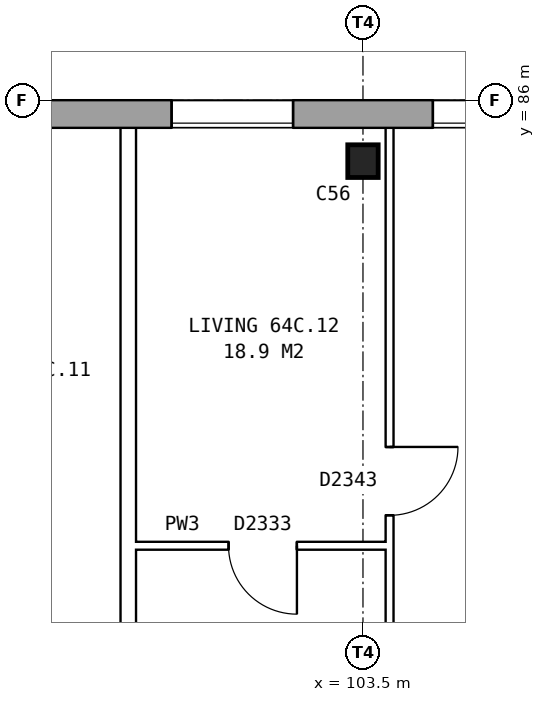
"""IFC4 building model, lengths in metres.
Left out: names, types, materials, properties, quantities, classifications, styles, units other than length and angle.
Written with IfcOpenShell. Run it as: python <this file> out.ifc"""

import sys

from ifc_helpers import new_model, si_unit, direction, frame, frame_2d, origin, origin_2d, place, context, subcontext, project, spatial, rectangle, i_section, extrude, element, fill, save


model = new_model("IFC4")
c1 = context("Model", 3, precision=1e-05, world=origin(), true_north=direction((0.0, 1.0)))
c2 = subcontext(c1, "Body", "Model", "MODEL_VIEW")
j1 = project(units=[si_unit("LENGTHUNIT", "METRE"), si_unit("PLANEANGLEUNIT", "RADIAN")], contexts=[c1])
p1 = place(None, origin())
s1 = spatial("IfcSite", under=j1, at=p1, CompositionType="ELEMENT")
p2 = place(p1, origin())
s2 = spatial("IfcBuilding", under=s1, at=p2, CompositionType="ELEMENT")
p3 = place(p2, frame((0.0, 0.0, 227.6)))
s3 = spatial("IfcBuildingStorey", under=s2, at=p3, CompositionType="ELEMENT", Elevation=227.6)
p4 = place(p3, frame((103.5, 85.2, 0.0), z_axis=(0.0, 0.0, 1.0), x_axis=(1.0, 0.0, 0.0)))
e1 = element("IfcColumn", 1, at=p4, inside=s3, PredefinedType="COLUMN", context=c2, shape_type="SweptSolid", body=[
    extrude(i_section(OverallWidth=0.4, OverallDepth=0.43, WebThickness=0.04, FlangeThickness=0.04, at=origin_2d()), origin(), (0.0, 0.0, 1.0), 2.85),
])
p5 = place(p3, frame((131.05, 85.82, 0.0), z_axis=(0.0, 0.0, 1.0), x_axis=(-1.0, 0.0, 0.0)))
e2 = element("IfcWall", 2, at=p5, inside=s3, PredefinedType="STANDARD", context=c2, shape_type="SweptSolid", body=[
    extrude(rectangle(XDim=55.1, YDim=0.36, at=frame_2d((27.55, 0.0))), origin(), (0.0, 0.0, 1.0), 2.85),
])
p6 = place(p5, frame((0.969, 0.0, 0.8)))
e3 = element("IfcOpeningElement", 3, at=p6, cuts=e2, PredefinedType="OPENING", context=c2, shape_type="SweptSolid", body=[
    extrude(rectangle(XDim=1.6, YDim=1.8, at=frame_2d((0.8, 0.9))), frame((0.0, 0.19, 0.0), z_axis=(0.0, -1.0, 0.0), x_axis=(1.0, 0.0, 0.0)), (0.0, 0.0, 1.0), 0.38),
])
p7 = place(p5, frame((4.406, 0.0, 0.8)))
e4 = element("IfcOpeningElement", 4, at=p7, cuts=e2, PredefinedType="OPENING", context=c2, shape_type="SweptSolid", body=[
    extrude(rectangle(XDim=1.6, YDim=1.8, at=frame_2d((0.8, 0.9))), frame((0.0, 0.19, 0.0), z_axis=(0.0, -1.0, 0.0), x_axis=(1.0, 0.0, 0.0)), (0.0, 0.0, 1.0), 0.38),
])
p8 = place(p5, frame((7.844, 0.0, 0.8)))
e5 = element("IfcOpeningElement", 5, at=p8, cuts=e2, PredefinedType="OPENING", context=c2, shape_type="SweptSolid", body=[
    extrude(rectangle(XDim=1.6, YDim=1.8, at=frame_2d((0.8, 0.9))), frame((0.0, 0.19, 0.0), z_axis=(0.0, -1.0, 0.0), x_axis=(1.0, 0.0, 0.0)), (0.0, 0.0, 1.0), 0.38),
])
p9 = place(p5, frame((11.281, 0.0, 0.8)))
e6 = element("IfcOpeningElement", 6, at=p9, cuts=e2, PredefinedType="OPENING", context=c2, shape_type="SweptSolid", body=[
    extrude(rectangle(XDim=1.6, YDim=1.8, at=frame_2d((0.8, 0.9))), frame((0.0, 0.19, 0.0), z_axis=(0.0, -1.0, 0.0), x_axis=(1.0, 0.0, 0.0)), (0.0, 0.0, 1.0), 0.38),
])
p10 = place(p5, frame((14.719, 0.0, 0.8)))
e7 = element("IfcOpeningElement", 7, at=p10, cuts=e2, PredefinedType="OPENING", context=c2, shape_type="SweptSolid", body=[
    extrude(rectangle(XDim=1.6, YDim=1.8, at=frame_2d((0.8, 0.9))), frame((0.0, 0.19, 0.0), z_axis=(0.0, -1.0, 0.0), x_axis=(1.0, 0.0, 0.0)), (0.0, 0.0, 1.0), 0.38),
])
p11 = place(p5, frame((18.156, 0.0, 0.8)))
e8 = element("IfcOpeningElement", 8, at=p11, cuts=e2, PredefinedType="OPENING", context=c2, shape_type="SweptSolid", body=[
    extrude(rectangle(XDim=1.6, YDim=1.8, at=frame_2d((0.8, 0.9))), frame((0.0, 0.19, 0.0), z_axis=(0.0, -1.0, 0.0), x_axis=(1.0, 0.0, 0.0)), (0.0, 0.0, 1.0), 0.38),
])
p12 = place(p5, frame((21.594, 0.0, 0.8)))
e9 = element("IfcOpeningElement", 9, at=p12, cuts=e2, PredefinedType="OPENING", context=c2, shape_type="SweptSolid", body=[
    extrude(rectangle(XDim=1.6, YDim=1.8, at=frame_2d((0.8, 0.9))), frame((0.0, 0.19, 0.0), z_axis=(0.0, -1.0, 0.0), x_axis=(1.0, 0.0, 0.0)), (0.0, 0.0, 1.0), 0.38),
])
p13 = place(p5, frame((25.031, 0.0, 0.8)))
e10 = element("IfcOpeningElement", 10, at=p13, cuts=e2, PredefinedType="OPENING", context=c2, shape_type="SweptSolid", body=[
    extrude(rectangle(XDim=1.6, YDim=1.8, at=frame_2d((0.8, 0.9))), frame((0.0, 0.19, 0.0), z_axis=(0.0, -1.0, 0.0), x_axis=(1.0, 0.0, 0.0)), (0.0, 0.0, 1.0), 0.38),
])
p14 = place(p5, frame((28.469, 0.0, 0.8)))
e11 = element("IfcOpeningElement", 11, at=p14, cuts=e2, PredefinedType="OPENING", context=c2, shape_type="SweptSolid", body=[
    extrude(rectangle(XDim=1.6, YDim=1.8, at=frame_2d((0.8, 0.9))), frame((0.0, 0.19, 0.0), z_axis=(0.0, -1.0, 0.0), x_axis=(1.0, 0.0, 0.0)), (0.0, 0.0, 1.0), 0.38),
])
p15 = place(p5, frame((31.906, 0.0, 0.8)))
e12 = element("IfcOpeningElement", 12, at=p15, cuts=e2, PredefinedType="OPENING", context=c2, shape_type="SweptSolid", body=[
    extrude(rectangle(XDim=1.6, YDim=1.8, at=frame_2d((0.8, 0.9))), frame((0.0, 0.19, 0.0), z_axis=(0.0, -1.0, 0.0), x_axis=(1.0, 0.0, 0.0)), (0.0, 0.0, 1.0), 0.38),
])
p16 = place(p5, frame((35.344, 0.0, 0.8)))
e13 = element("IfcOpeningElement", 13, at=p16, cuts=e2, PredefinedType="OPENING", context=c2, shape_type="SweptSolid", body=[
    extrude(rectangle(XDim=1.6, YDim=1.8, at=frame_2d((0.8, 0.9))), frame((0.0, 0.19, 0.0), z_axis=(0.0, -1.0, 0.0), x_axis=(1.0, 0.0, 0.0)), (0.0, 0.0, 1.0), 0.38),
])
p17 = place(p5, frame((38.781, 0.0, 0.8)))
e14 = element("IfcOpeningElement", 14, at=p17, cuts=e2, PredefinedType="OPENING", context=c2, shape_type="SweptSolid", body=[
    extrude(rectangle(XDim=1.6, YDim=1.8, at=frame_2d((0.8, 0.9))), frame((0.0, 0.19, 0.0), z_axis=(0.0, -1.0, 0.0), x_axis=(1.0, 0.0, 0.0)), (0.0, 0.0, 1.0), 0.38),
])
p18 = place(p5, frame((42.219, 0.0, 0.8)))
e15 = element("IfcOpeningElement", 15, at=p18, cuts=e2, PredefinedType="OPENING", context=c2, shape_type="SweptSolid", body=[
    extrude(rectangle(XDim=1.6, YDim=1.8, at=frame_2d((0.8, 0.9))), frame((0.0, 0.19, 0.0), z_axis=(0.0, -1.0, 0.0), x_axis=(1.0, 0.0, 0.0)), (0.0, 0.0, 1.0), 0.38),
])
p19 = place(p5, frame((45.656, 0.0, 0.8)))
e16 = element("IfcOpeningElement", 16, at=p19, cuts=e2, PredefinedType="OPENING", context=c2, shape_type="SweptSolid", body=[
    extrude(rectangle(XDim=1.6, YDim=1.8, at=frame_2d((0.8, 0.9))), frame((0.0, 0.19, 0.0), z_axis=(0.0, -1.0, 0.0), x_axis=(1.0, 0.0, 0.0)), (0.0, 0.0, 1.0), 0.38),
])
p20 = place(p5, frame((49.094, 0.0, 0.8)))
e17 = element("IfcOpeningElement", 17, at=p20, cuts=e2, PredefinedType="OPENING", context=c2, shape_type="SweptSolid", body=[
    extrude(rectangle(XDim=1.6, YDim=1.8, at=frame_2d((0.8, 0.9))), frame((0.0, 0.19, 0.0), z_axis=(0.0, -1.0, 0.0), x_axis=(1.0, 0.0, 0.0)), (0.0, 0.0, 1.0), 0.38),
])
p21 = place(p5, frame((52.531, 0.0, 0.8)))
e18 = element("IfcOpeningElement", 18, at=p21, cuts=e2, PredefinedType="OPENING", context=c2, shape_type="SweptSolid", body=[
    extrude(rectangle(XDim=1.6, YDim=1.8, at=frame_2d((0.8, 0.9))), frame((0.0, 0.19, 0.0), z_axis=(0.0, -1.0, 0.0), x_axis=(1.0, 0.0, 0.0)), (0.0, 0.0, 1.0), 0.38),
])
p22 = place(p3, frame((100.512, 80.14, 0.0), z_axis=(0.0, 0.0, 1.0), x_axis=(1.0, 0.0, 0.0)))
e19 = element("IfcWall", 19, at=p22, inside=s3, PredefinedType="PARTITIONING", context=c2, shape_type="SweptSolid", body=[
    extrude(rectangle(XDim=3.338, YDim=0.1, at=frame_2d((1.669, 0.0))), origin(), (0.0, 0.0, 1.0), 2.85),
])
p23 = place(p22, frame((1.219, 0.0, 0.0)))
e20 = element("IfcOpeningElement", 20, at=p23, cuts=e19, PredefinedType="OPENING", context=c2, shape_type="SweptSolid", body=[
    extrude(rectangle(XDim=0.9, YDim=2.1, at=frame_2d((0.45, 1.05))), frame((0.0, 0.06, 0.0), z_axis=(0.0, -1.0, 0.0), x_axis=(1.0, 0.0, 0.0)), (0.0, 0.0, 1.0), 0.12),
])
p24 = place(p3, frame((100.412, 71.3, 0.0), z_axis=(0.0, 0.0, 1.0), x_axis=(0.0, 1.0, 0.0)))
e21 = element("IfcWall", 21, at=p24, inside=s3, PredefinedType="PARTITIONING", context=c2, shape_type="SweptSolid", body=[
    extrude(rectangle(XDim=14.34, YDim=0.2, at=frame_2d((7.17, 0.0))), origin(), (0.0, 0.0, 1.0), 2.85),
])
p25 = place(p3, frame((103.85, 71.3, 0.0), z_axis=(0.0, 0.0, 1.0), x_axis=(0.0, 1.0, 0.0)))
e22 = element("IfcWall", 22, at=p25, inside=s3, PredefinedType="PARTITIONING", context=c2, shape_type="SweptSolid", body=[
    extrude(rectangle(XDim=14.34, YDim=0.1, at=frame_2d((7.17, 0.0))), origin(), (0.0, 0.0, 1.0), 2.85),
])
p26 = place(p25, frame((9.24, 0.0, 0.0)))
e23 = element("IfcOpeningElement", 23, at=p26, cuts=e22, PredefinedType="OPENING", context=c2, shape_type="SweptSolid", body=[
    extrude(rectangle(XDim=0.9, YDim=2.1, at=frame_2d((0.45, 1.05))), frame((0.0, 0.06, 0.0), z_axis=(0.0, -1.0, 0.0), x_axis=(1.0, 0.0, 0.0)), (0.0, 0.0, 1.0), 0.12),
])
p27 = place(p25, frame((0.4, 0.0, 0.0)))
e24 = element("IfcOpeningElement", 24, at=p27, cuts=e22, PredefinedType="OPENING", context=c2, shape_type="SweptSolid", body=[
    extrude(rectangle(XDim=0.9, YDim=2.1, at=frame_2d((0.45, 1.05))), frame((0.0, 0.06, 0.0), z_axis=(0.0, -1.0, 0.0), x_axis=(1.0, 0.0, 0.0)), (0.0, 0.0, 1.0), 0.12),
])
p28 = place(p13, origin())
e25 = element("IfcWindow", 25, at=p28, inside=s3, PartitioningType="SINGLE_PANEL", PredefinedType="WINDOW", context=c2, shape_type="SweptSolid", body=[
    extrude(rectangle(XDim=1.6, YDim=1.8, at=frame_2d((0.8, 0.9))), frame((0.0, 0.15, 0.0), z_axis=(0.0, -1.0, 0.0), x_axis=(1.0, 0.0, 0.0)), (0.0, 0.0, 1.0), 0.06),
])
fill(e10, e25)
p29 = place(p14, origin())
e26 = element("IfcWindow", 26, at=p29, inside=s3, PartitioningType="SINGLE_PANEL", PredefinedType="WINDOW", context=c2, shape_type="SweptSolid", body=[
    extrude(rectangle(XDim=1.6, YDim=1.8, at=frame_2d((0.8, 0.9))), frame((0.0, 0.15, 0.0), z_axis=(0.0, -1.0, 0.0), x_axis=(1.0, 0.0, 0.0)), (0.0, 0.0, 1.0), 0.06),
])
fill(e11, e26)
p30 = place(p26, frame((0.9, 0.0, 0.0), z_axis=(0.0, 0.0, 1.0), x_axis=(-1.0, 0.0, 0.0)))
e27 = element("IfcDoor", 27, at=p30, inside=s3, OperationType="SINGLE_SWING_LEFT", PredefinedType="DOOR", context=c2, shape_type="SweptSolid", body=[
    extrude(rectangle(XDim=0.9, YDim=2.1, at=frame_2d((0.45, 1.05))), frame((0.0, 0.025, 0.0), z_axis=(0.0, -1.0, 0.0), x_axis=(1.0, 0.0, 0.0)), (0.0, 0.0, 1.0), 0.05),
])
fill(e23, e27)
p31 = place(p23, frame((0.9, 0.0, 0.0), z_axis=(0.0, 0.0, 1.0), x_axis=(-1.0, 0.0, 0.0)))
e28 = element("IfcDoor", 28, at=p31, inside=s3, OperationType="SINGLE_SWING_LEFT", PredefinedType="DOOR", context=c2, shape_type="SweptSolid", body=[
    extrude(rectangle(XDim=0.9, YDim=2.1, at=frame_2d((0.45, 1.05))), frame((0.0, 0.025, 0.0), z_axis=(0.0, -1.0, 0.0), x_axis=(1.0, 0.0, 0.0)), (0.0, 0.0, 1.0), 0.05),
])
fill(e20, e28)
save(model, sys.argv[1])
